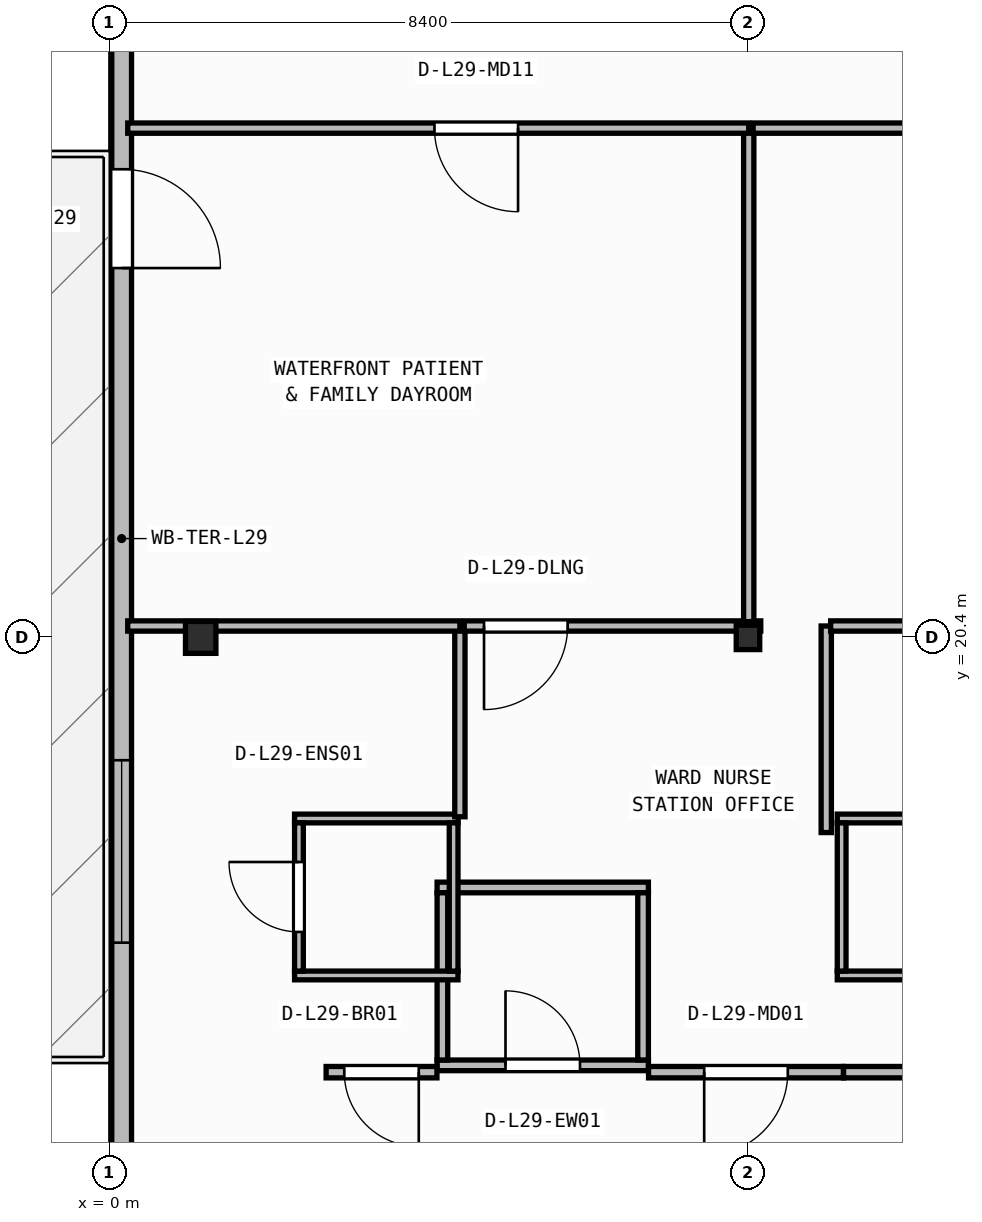
"""IFC4 building model, lengths in metres.
Left out: names, types, materials, properties, quantities, classifications, styles, units other than length and angle.
Written with IfcOpenShell. Run it as: python <this file> out.ifc"""

import sys

from ifc_helpers import new_model, si_unit, direction, frame, frame_2d, origin, origin_2d, place, context, subcontext, project, spatial, rectangle, i_section, extrude, element, fill, save


model = new_model("IFC4")
c1 = context("Model", 3, precision=1e-05, world=origin(), true_north=direction((0.0, 1.0)))
c2 = subcontext(c1, "Body", "Model", "MODEL_VIEW")
j1 = project(units=[si_unit("LENGTHUNIT", "METRE"), si_unit("PLANEANGLEUNIT", "RADIAN")], contexts=[c1])
p1 = place(None, origin())
s1 = spatial("IfcSite", under=j1, at=p1, CompositionType="ELEMENT")
p2 = place(p1, origin())
s2 = spatial("IfcBuilding", under=s1, at=p2, CompositionType="ELEMENT")
p3 = place(p2, frame((0.0, 0.0, 119.15)))
s3 = spatial("IfcBuildingStorey", under=s2, at=p3, CompositionType="ELEMENT", Elevation=119.15)
p4 = place(p3, frame((1.2, 20.4, 0.0), z_axis=(0.0, 0.0, 1.0), x_axis=(1.0, 0.0, 0.0)))
e1 = element("IfcColumn", 1, at=p4, inside=s3, PredefinedType="COLUMN", context=c2, shape_type="SweptSolid", body=[
    extrude(i_section(OverallWidth=0.4, OverallDepth=0.42, WebThickness=0.025, FlangeThickness=0.04, at=origin_2d()), origin(), (0.0, 0.0, 1.0), 3.95),
])
p5 = place(p3, frame((8.4, 20.4, 0.0), z_axis=(0.0, 0.0, 1.0), x_axis=(1.0, 0.0, 0.0)))
e2 = element("IfcColumn", 2, at=p5, inside=s3, PredefinedType="COLUMN", context=c2, shape_type="SweptSolid", body=[
    extrude(i_section(OverallWidth=0.309, OverallDepth=0.321, WebThickness=0.014, FlangeThickness=0.022, FilletRadius=0.017, at=origin_2d()), origin(), (0.0, 0.0, 1.0), 3.95),
])
p6 = place(p3, frame((0.16, 40.64, 0.0), z_axis=(0.0, 0.0, 1.0), x_axis=(0.0, -1.0, 0.0)))
e3 = element("IfcWall", 3, at=p6, inside=s3, PredefinedType="STANDARD", context=c2, shape_type="SweptSolid", body=[
    extrude(rectangle(XDim=37.88, YDim=0.26, at=frame_2d((18.94, 0.0))), origin(), (0.0, 0.0, 1.0), 3.71),
])
p7 = place(p6, frame((14.081, 0.0, 0.0)))
e4 = element("IfcOpeningElement", 4, at=p7, cuts=e3, PredefinedType="OPENING", context=c2, shape_type="SweptSolid", body=[
    extrude(rectangle(XDim=1.3, YDim=2.15, at=frame_2d((0.65, 1.075))), frame((0.0, 0.14, 0.0), z_axis=(0.0, -1.0, 0.0), x_axis=(1.0, 0.0, 0.0)), (0.0, 0.0, 1.0), 0.28),
])
p8 = place(p6, frame((21.856, 0.0, 0.9)))
e5 = element("IfcOpeningElement", 5, at=p8, cuts=e3, PredefinedType="OPENING", context=c2, shape_type="SweptSolid", body=[
    extrude(rectangle(XDim=2.4, YDim=1.65, at=frame_2d((1.2, 0.825))), frame((0.0, 0.14, 0.0), z_axis=(0.0, -1.0, 0.0), x_axis=(1.0, 0.0, 0.0)), (0.0, 0.0, 1.0), 0.28),
])
p9 = place(p3, frame((4.31, 14.77, 0.0), z_axis=(0.0, 0.0, 1.0), x_axis=(1.0, 0.0, 0.0)))
e6 = element("IfcWall", 6, at=p9, inside=s3, PredefinedType="PARTITIONING", context=c2, shape_type="SweptSolid", body=[
    extrude(rectangle(XDim=2.78, YDim=0.14, at=frame_2d((1.39, 0.0))), origin(), (0.0, 0.0, 1.0), 3.71),
])
p10 = place(p9, frame((0.9, 0.0, 0.0)))
e7 = element("IfcOpeningElement", 7, at=p10, cuts=e6, PredefinedType="OPENING", context=c2, shape_type="SweptSolid", body=[
    extrude(rectangle(XDim=0.98, YDim=2.1, at=frame_2d((0.49, 1.05))), frame((0.0, 0.08, 0.0), z_axis=(0.0, -1.0, 0.0), x_axis=(1.0, 0.0, 0.0)), (0.0, 0.0, 1.0), 0.16),
])
p11 = place(p3, frame((4.31, 17.11, 0.0), z_axis=(0.0, 0.0, 1.0), x_axis=(1.0, 0.0, 0.0)))
e8 = element("IfcWall", 8, at=p11, inside=s3, PredefinedType="PARTITIONING", context=c2, shape_type="SweptSolid", body=[
    extrude(rectangle(XDim=2.78, YDim=0.14, at=frame_2d((1.39, 0.0))), origin(), (0.0, 0.0, 1.0), 3.71),
])
for number, where, z_axis, x_axis in (
    (9, (4.38, 14.84, 0.0), (0.0, 0.0, 1.0), (0.0, 1.0, 0.0)),
    (10, (7.02, 14.84, 0.0), (0.0, 0.0, 1.0), (0.0, 1.0, 0.0)),
):
    element("IfcWall", number, at=place(p3, frame(where, z_axis=z_axis, x_axis=x_axis)), inside=s3, PredefinedType="PARTITIONING", context=c2, shape_type="SweptSolid", body=[
        extrude(rectangle(XDim=2.2, YDim=0.14, at=frame_2d((1.1, 0.0))), origin(), (0.0, 0.0, 1.0), 3.71),
    ])
for number, where, z_axis, x_axis in (
    (11, (2.435, 15.952, 0.0), (0.0, 0.0, 1.0), (1.0, 0.0, 0.0)),
    (12, (2.435, 18.018, 0.0), (0.0, 0.0, 1.0), (1.0, 0.0, 0.0)),
):
    element("IfcWall", number, at=place(p3, frame(where, z_axis=z_axis, x_axis=x_axis)), inside=s3, PredefinedType="PARTITIONING", context=c2, shape_type="SweptSolid", body=[
        extrude(rectangle(XDim=2.15, YDim=0.115, at=frame_2d((1.075, 0.0))), origin(), (0.0, 0.0, 1.0), 3.71),
    ])
p12 = place(p3, frame((2.492, 16.01, 0.0), z_axis=(0.0, 0.0, 1.0), x_axis=(0.0, 1.0, 0.0)))
e13 = element("IfcWall", 13, at=p12, inside=s3, PredefinedType="PARTITIONING", context=c2, shape_type="SweptSolid", body=[
    extrude(rectangle(XDim=1.95, YDim=0.115, at=frame_2d((0.975, 0.0))), origin(), (0.0, 0.0, 1.0), 3.71),
])
p13 = place(p12, frame((0.515, 0.0, 0.0)))
e14 = element("IfcOpeningElement", 14, at=p13, cuts=e13, PredefinedType="OPENING", context=c2, shape_type="SweptSolid", body=[
    extrude(rectangle(XDim=0.92, YDim=2.1, at=frame_2d((0.46, 1.05))), frame((0.0, 0.067, 0.0), z_axis=(0.0, -1.0, 0.0), x_axis=(1.0, 0.0, 0.0)), (0.0, 0.0, 1.0), 0.135),
])
p14 = place(p3, frame((4.528, 16.01, 0.0), z_axis=(0.0, 0.0, 1.0), x_axis=(0.0, 1.0, 0.0)))
e15 = element("IfcWall", 15, at=p14, inside=s3, PredefinedType="PARTITIONING", context=c2, shape_type="SweptSolid", body=[
    extrude(rectangle(XDim=1.95, YDim=0.115, at=frame_2d((0.975, 0.0))), origin(), (0.0, 0.0, 1.0), 3.71),
])
for number, where, z_axis, x_axis in (
    (16, (9.575, 15.952, 0.0), (0.0, 0.0, 1.0), (1.0, 0.0, 0.0)),
    (17, (9.575, 18.018, 0.0), (0.0, 0.0, 1.0), (1.0, 0.0, 0.0)),
):
    element("IfcWall", number, at=place(p3, frame(where, z_axis=z_axis, x_axis=x_axis)), inside=s3, PredefinedType="PARTITIONING", context=c2, shape_type="SweptSolid", body=[
        extrude(rectangle(XDim=2.15, YDim=0.115, at=frame_2d((1.075, 0.0))), origin(), (0.0, 0.0, 1.0), 3.71),
    ])
p15 = place(p3, frame((9.633, 16.01, 0.0), z_axis=(0.0, 0.0, 1.0), x_axis=(0.0, 1.0, 0.0)))
e18 = element("IfcWall", 18, at=p15, inside=s3, PredefinedType="PARTITIONING", context=c2, shape_type="SweptSolid", body=[
    extrude(rectangle(XDim=1.95, YDim=0.115, at=frame_2d((0.975, 0.0))), origin(), (0.0, 0.0, 1.0), 3.71),
])
p16 = place(p3, frame((4.308, 14.68, 0.0), z_axis=(0.0, 0.0, 1.0), x_axis=(-1.0, 0.0, 0.0)))
e19 = element("IfcWall", 19, at=p16, inside=s3, PredefinedType="PARTITIONING", context=c2, shape_type="SweptSolid", body=[
    extrude(rectangle(XDim=1.458, YDim=0.15, at=frame_2d((0.729, 0.0))), origin(), (0.0, 0.0, 1.0), 3.71),
])
p17 = place(p16, frame((0.239, 0.0, 0.0)))
e20 = element("IfcOpeningElement", 20, at=p17, cuts=e19, PredefinedType="OPENING", context=c2, shape_type="SweptSolid", body=[
    extrude(rectangle(XDim=0.98, YDim=2.1, at=frame_2d((0.49, 1.05))), frame((0.0, 0.085, 0.0), z_axis=(0.0, -1.0, 0.0), x_axis=(1.0, 0.0, 0.0)), (0.0, 0.0, 1.0), 0.17),
])
p18 = place(p3, frame((9.656, 14.68, 0.0), z_axis=(0.0, 0.0, 1.0), x_axis=(-1.0, 0.0, 0.0)))
e21 = element("IfcWall", 21, at=p18, inside=s3, PredefinedType="PARTITIONING", context=c2, shape_type="SweptSolid", body=[
    extrude(rectangle(XDim=2.564, YDim=0.15, at=frame_2d((1.282, 0.0))), origin(), (0.0, 0.0, 1.0), 3.71),
])
p19 = place(p18, frame((0.732, 0.0, 0.0)))
e22 = element("IfcOpeningElement", 22, at=p19, cuts=e21, PredefinedType="OPENING", context=c2, shape_type="SweptSolid", body=[
    extrude(rectangle(XDim=1.1, YDim=2.1, at=frame_2d((0.55, 1.05))), frame((0.0, 0.085, 0.0), z_axis=(0.0, -1.0, 0.0), x_axis=(1.0, 0.0, 0.0)), (0.0, 0.0, 1.0), 0.17),
])
p20 = place(p3, frame((14.856, 14.68, 0.0), z_axis=(0.0, 0.0, 1.0), x_axis=(-1.0, 0.0, 0.0)))
e23 = element("IfcWall", 23, at=p20, inside=s3, PredefinedType="PARTITIONING", context=c2, shape_type="SweptSolid", body=[
    extrude(rectangle(XDim=5.198, YDim=0.15, at=frame_2d((2.599, 0.0))), origin(), (0.0, 0.0, 1.0), 3.71),
])
p21 = place(p20, frame((1.949, 0.0, 0.0)))
e24 = element("IfcOpeningElement", 24, at=p21, cuts=e23, PredefinedType="OPENING", context=c2, shape_type="SweptSolid", body=[
    extrude(rectangle(XDim=1.3, YDim=2.15, at=frame_2d((0.65, 1.075))), frame((0.0, 0.085, 0.0), z_axis=(0.0, -1.0, 0.0), x_axis=(1.0, 0.0, 0.0)), (0.0, 0.0, 1.0), 0.17),
])
p22 = place(p3, frame((4.61, 18.04, 0.0), z_axis=(0.0, 0.0, 1.0), x_axis=(0.0, 1.0, 0.0)))
e25 = element("IfcWall", 25, at=p22, inside=s3, PredefinedType="PARTITIONING", context=c2, shape_type="SweptSolid", body=[
    extrude(rectangle(XDim=2.51, YDim=0.135, at=frame_2d((1.255, 0.0))), origin(), (0.0, 0.0, 1.0), 3.71),
])
p23 = place(p3, frame((4.61, 20.55, 0.0), z_axis=(0.0, 0.0, 1.0), x_axis=(-1.0, 0.0, 0.0)))
e26 = element("IfcWall", 26, at=p23, inside=s3, PredefinedType="PARTITIONING", context=c2, shape_type="SweptSolid", body=[
    extrude(rectangle(XDim=4.37, YDim=0.135, at=frame_2d((2.185, 0.0))), origin(), (0.0, 0.0, 1.0), 3.083),
])
p24 = place(p3, frame((9.43, 17.833, 0.0), z_axis=(0.0, 0.0, 1.0), x_axis=(0.0, 1.0, 0.0)))
e27 = element("IfcWall", 27, at=p24, inside=s3, PredefinedType="PARTITIONING", context=c2, shape_type="SweptSolid", body=[
    extrude(rectangle(XDim=2.718, YDim=0.135, at=frame_2d((1.359, 0.0))), origin(), (0.0, 0.0, 1.0), 3.71),
])
p25 = place(p3, frame((8.568, 20.55, 0.0), z_axis=(0.0, 0.0, 1.0), x_axis=(-1.0, 0.0, 0.0)))
e28 = element("IfcWall", 28, at=p25, inside=s3, PredefinedType="PARTITIONING", context=c2, shape_type="SweptSolid", body=[
    extrude(rectangle(XDim=3.901, YDim=0.135, at=frame_2d((1.95, 0.0))), origin(), (0.0, 0.0, 1.0), 3.083),
])
p26 = place(p25, frame((2.541, 0.0, 0.0)))
e29 = element("IfcOpeningElement", 29, at=p26, cuts=e28, PredefinedType="OPENING", context=c2, shape_type="SweptSolid", body=[
    extrude(rectangle(XDim=1.1, YDim=2.1, at=frame_2d((0.55, 1.05))), frame((0.0, 0.077, 0.0), z_axis=(0.0, -1.0, 0.0), x_axis=(1.0, 0.0, 0.0)), (0.0, 0.0, 1.0), 0.155),
])
p27 = place(p3, frame((14.63, 20.55, 0.0), z_axis=(0.0, 0.0, 1.0), x_axis=(-1.0, 0.0, 0.0)))
e30 = element("IfcWall", 30, at=p27, inside=s3, PredefinedType="PARTITIONING", context=c2, shape_type="SweptSolid", body=[
    extrude(rectangle(XDim=5.142, YDim=0.135, at=frame_2d((2.571, 0.0))), origin(), (0.0, 0.0, 1.0), 3.083),
])
p28 = place(p3, frame((8.41, 20.607, 0.0), z_axis=(0.0, 0.0, 1.0), x_axis=(0.0, 1.0, 0.0)))
e31 = element("IfcWall", 31, at=p28, inside=s3, PredefinedType="PARTITIONING", context=c2, shape_type="SweptSolid", body=[
    extrude(rectangle(XDim=6.493, YDim=0.135, at=frame_2d((3.246, 0.0))), origin(), (0.0, 0.0, 1.0), 3.152),
])
p29 = place(p3, frame((8.41, 27.1, 0.0), z_axis=(0.0, 0.0, 1.0), x_axis=(-1.0, 0.0, 0.0)))
e32 = element("IfcWall", 32, at=p29, inside=s3, PredefinedType="PARTITIONING", context=c2, shape_type="SweptSolid", body=[
    extrude(rectangle(XDim=8.17, YDim=0.135, at=frame_2d((4.085, 0.0))), origin(), (0.0, 0.0, 1.0), 3.71),
])
p30 = place(p29, frame((3.035, 0.0, 0.0)))
e33 = element("IfcOpeningElement", 33, at=p30, cuts=e32, PredefinedType="OPENING", context=c2, shape_type="SweptSolid", body=[
    extrude(rectangle(XDim=1.1, YDim=2.1, at=frame_2d((0.55, 1.05))), frame((0.0, 0.077, 0.0), z_axis=(0.0, -1.0, 0.0), x_axis=(1.0, 0.0, 0.0)), (0.0, 0.0, 1.0), 0.155),
])
p31 = place(p3, frame((19.135, 27.1, 0.0), z_axis=(0.0, 0.0, 1.0), x_axis=(-1.0, 0.0, 0.0)))
e34 = element("IfcWall", 34, at=p31, inside=s3, PredefinedType="PARTITIONING", context=c2, shape_type="SweptSolid", body=[
    extrude(rectangle(XDim=10.667, YDim=0.135, at=frame_2d((5.334, 0.0))), origin(), (0.0, 0.0, 1.0), 3.71),
])
p32 = place(p7, origin())
e35 = element("IfcDoor", 35, at=p32, inside=s3, OperationType="SINGLE_SWING_RIGHT", PredefinedType="DOOR", context=c2, shape_type="SweptSolid", body=[
    extrude(rectangle(XDim=1.3, YDim=2.15, at=frame_2d((0.65, 1.075))), frame((0.0, 0.025, 0.0), z_axis=(0.0, -1.0, 0.0), x_axis=(1.0, 0.0, 0.0)), (0.0, 0.0, 1.0), 0.05),
])
fill(e4, e35)
p33 = place(p10, origin())
e36 = element("IfcDoor", 36, at=p33, inside=s3, OperationType="SINGLE_SWING_LEFT", PredefinedType="DOOR", context=c2, shape_type="SweptSolid", body=[
    extrude(rectangle(XDim=0.98, YDim=2.1, at=frame_2d((0.49, 1.05))), frame((0.0, 0.025, 0.0), z_axis=(0.0, -1.0, 0.0), x_axis=(1.0, 0.0, 0.0)), (0.0, 0.0, 1.0), 0.05),
])
fill(e7, e36)
p34 = place(p13, origin())
e37 = element("IfcDoor", 37, at=p34, inside=s3, OperationType="SINGLE_SWING_RIGHT", PredefinedType="DOOR", context=c2, shape_type="SweptSolid", body=[
    extrude(rectangle(XDim=0.92, YDim=2.1, at=frame_2d((0.46, 1.05))), frame((0.0, 0.025, 0.0), z_axis=(0.0, -1.0, 0.0), x_axis=(1.0, 0.0, 0.0)), (0.0, 0.0, 1.0), 0.05),
])
fill(e14, e37)
p35 = place(p17, origin())
e38 = element("IfcDoor", 38, at=p35, inside=s3, OperationType="SINGLE_SWING_LEFT", PredefinedType="DOOR", context=c2, shape_type="SweptSolid", body=[
    extrude(rectangle(XDim=0.98, YDim=2.1, at=frame_2d((0.49, 1.05))), frame((0.0, 0.025, 0.0), z_axis=(0.0, -1.0, 0.0), x_axis=(1.0, 0.0, 0.0)), (0.0, 0.0, 1.0), 0.05),
])
fill(e20, e38)
p36 = place(p19, origin())
e39 = element("IfcDoor", 39, at=p36, inside=s3, OperationType="SINGLE_SWING_RIGHT", PredefinedType="DOOR", context=c2, shape_type="SweptSolid", body=[
    extrude(rectangle(XDim=1.1, YDim=2.1, at=frame_2d((0.55, 1.05))), frame((0.0, 0.025, 0.0), z_axis=(0.0, -1.0, 0.0), x_axis=(1.0, 0.0, 0.0)), (0.0, 0.0, 1.0), 0.05),
])
fill(e22, e39)
p37 = place(p26, origin())
e40 = element("IfcDoor", 40, at=p37, inside=s3, OperationType="SINGLE_SWING_RIGHT", PredefinedType="DOOR", context=c2, shape_type="SweptSolid", body=[
    extrude(rectangle(XDim=1.1, YDim=2.1, at=frame_2d((0.55, 1.05))), frame((0.0, 0.025, 0.0), z_axis=(0.0, -1.0, 0.0), x_axis=(1.0, 0.0, 0.0)), (0.0, 0.0, 1.0), 0.05),
])
fill(e29, e40)
p38 = place(p30, origin())
e41 = element("IfcDoor", 41, at=p38, inside=s3, OperationType="SINGLE_SWING_LEFT", PredefinedType="DOOR", context=c2, shape_type="SweptSolid", body=[
    extrude(rectangle(XDim=1.1, YDim=2.1, at=frame_2d((0.55, 1.05))), frame((0.0, 0.025, 0.0), z_axis=(0.0, -1.0, 0.0), x_axis=(1.0, 0.0, 0.0)), (0.0, 0.0, 1.0), 0.05),
])
fill(e33, e41)
p39 = place(p8, origin())
e42 = element("IfcWindow", 42, at=p39, inside=s3, PartitioningType="SINGLE_PANEL", PredefinedType="WINDOW", context=c2, shape_type="SweptSolid", body=[
    extrude(rectangle(XDim=2.4, YDim=1.65, at=frame_2d((1.2, 0.825))), frame((0.0, 0.03, 0.0), z_axis=(0.0, -1.0, 0.0), x_axis=(1.0, 0.0, 0.0)), (0.0, 0.0, 1.0), 0.06),
])
fill(e5, e42)
save(model, sys.argv[1])
